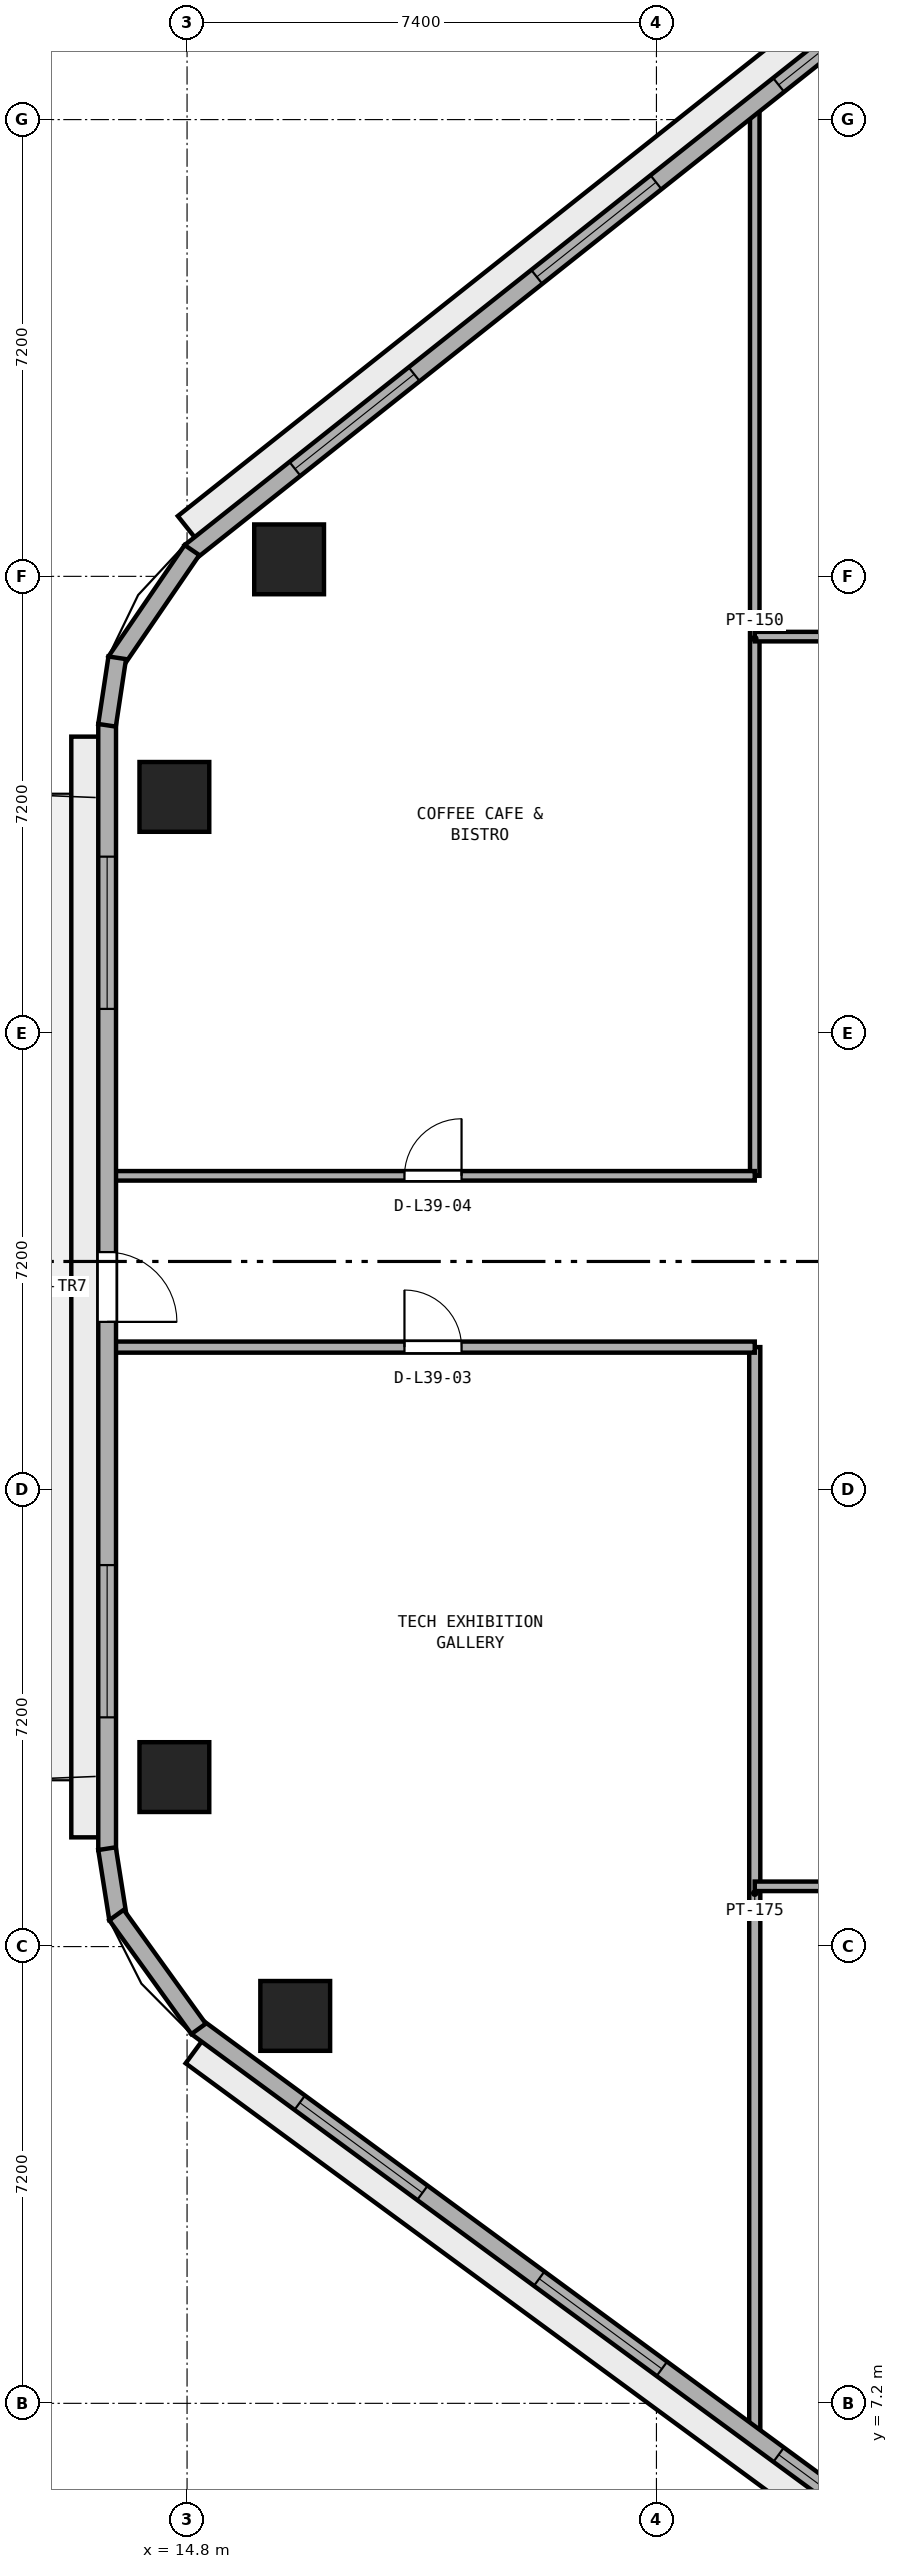
"""IFC4 building model, lengths in metres.
Left out: names, types, materials, properties, quantities, classifications, styles, units other than length and angle.
Written with IfcOpenShell. Run it as: python <this file> out.ifc"""

import sys

from ifc_helpers import new_model, si_unit, direction, frame, frame_2d, origin, origin_2d, place, context, subcontext, project, spatial, rectangle, extrude, element, fill, save


model = new_model("IFC4")
c1 = context("Model", 3, precision=1e-05, world=origin(), true_north=direction((0.0, 1.0)))
c2 = subcontext(c1, "Body", "Model", "MODEL_VIEW")
j1 = project(units=[si_unit("LENGTHUNIT", "METRE"), si_unit("PLANEANGLEUNIT", "RADIAN")], contexts=[c1])
p1 = place(None, origin())
s1 = spatial("IfcSite", under=j1, at=p1, CompositionType="ELEMENT")
p2 = place(p1, origin())
s2 = spatial("IfcBuilding", under=s1, at=p2, CompositionType="ELEMENT")
p3 = place(p2, frame((0.0, 0.0, 155.4)))
s3 = spatial("IfcBuildingStorey", under=s2, at=p3, CompositionType="ELEMENT", Elevation=155.4)
for number, where, z_axis, x_axis in (
    (1, (16.409, 36.268, 0.0), (0.0, 0.0, 1.0), (1.0, 0.0, 0.0)),
    (2, (14.6, 32.523, 0.0), (0.0, 0.0, 1.0), (1.0, 0.0, 0.0)),
    (3, (14.6, 17.072, 0.0), (0.0, 0.0, 1.0), (1.0, 0.0, 0.0)),
    (4, (16.505, 13.307, 0.0), (0.0, 0.0, 1.0), (1.0, 0.0, 0.0)),
):
    element("IfcColumn", number, at=place(p3, frame(where, z_axis=z_axis, x_axis=x_axis)), inside=s3, PredefinedType="COLUMN", context=c2, shape_type="SweptSolid", body=[
        extrude(rectangle(XDim=1.1, YDim=1.1, at=origin_2d()), origin(), (0.0, 0.0, 1.0), 3.8),
    ])
p4 = place(p3, frame((23.75, 6.634, 0.0), z_axis=(0.0, 0.0, 1.0), x_axis=(0.0, 1.0, 0.0)))
e5 = element("IfcWall", 5, at=p4, inside=s3, PredefinedType="PARTITIONING", context=c2, shape_type="SweptSolid", body=[
    extrude(rectangle(XDim=17.216, YDim=0.175, at=frame_2d((8.608, 0.0))), origin(), (0.0, 0.0, 1.0), 3.54),
])
p5 = place(p3, frame((23.75, 26.55, 0.0), z_axis=(0.0, 0.0, 1.0), x_axis=(0.0, 1.0, 0.0)))
e6 = element("IfcWall", 6, at=p5, inside=s3, PredefinedType="PARTITIONING", context=c2, shape_type="SweptSolid", body=[
    extrude(rectangle(XDim=16.937, YDim=0.15, at=frame_2d((8.468, 0.0))), origin(), (0.0, 0.0, 1.0), 3.54),
])
p6 = place(p3, frame((23.75, 15.35, 0.0), z_axis=(0.0, 0.0, 1.0), x_axis=(1.0, 0.0, 0.0)))
e7 = element("IfcWall", 7, at=p6, inside=s3, PredefinedType="PARTITIONING", context=c2, shape_type="SweptSolid", body=[
    extrude(rectangle(XDim=10.65, YDim=0.15, at=frame_2d((5.325, 0.0))), origin(), (0.0, 0.0, 1.0), 3.54),
])
p7 = place(p6, frame((4.875, 0.0, 0.0)))
e8 = element("IfcOpeningElement", 8, at=p7, cuts=e7, PredefinedType="OPENING", context=c2, shape_type="SweptSolid", body=[
    extrude(rectangle(XDim=0.9, YDim=2.1, at=frame_2d((0.45, 1.05))), frame((0.0, 0.085, 0.0), z_axis=(0.0, -1.0, 0.0), x_axis=(1.0, 0.0, 0.0)), (0.0, 0.0, 1.0), 0.17),
])
p8 = place(p3, frame((13.605, 23.85, 0.0), z_axis=(0.0, 0.0, 1.0), x_axis=(1.0, 0.0, 0.0)))
e9 = element("IfcWall", 9, at=p8, inside=s3, PredefinedType="PARTITIONING", context=c2, shape_type="SweptSolid", body=[
    extrude(rectangle(XDim=10.145, YDim=0.175, at=frame_2d((5.073, 0.0))), origin(), (0.0, 0.0, 1.0), 3.54),
])
p9 = place(p8, frame((4.623, 0.0, 0.0)))
e10 = element("IfcOpeningElement", 10, at=p9, cuts=e9, PredefinedType="OPENING", context=c2, shape_type="SweptSolid", body=[
    extrude(rectangle(XDim=0.9, YDim=2.1, at=frame_2d((0.45, 1.05))), frame((0.0, 0.097, 0.0), z_axis=(0.0, -1.0, 0.0), x_axis=(1.0, 0.0, 0.0)), (0.0, 0.0, 1.0), 0.195),
])
p10 = place(p3, frame((13.605, 26.55, 0.0), z_axis=(0.0, 0.0, 1.0), x_axis=(1.0, 0.0, 0.0)))
e11 = element("IfcWall", 11, at=p10, inside=s3, PredefinedType="PARTITIONING", context=c2, shape_type="SweptSolid", body=[
    extrude(rectangle(XDim=10.145, YDim=0.15, at=frame_2d((5.073, 0.0))), origin(), (0.0, 0.0, 1.0), 3.54),
])
p11 = place(p10, frame((4.623, 0.0, 0.0)))
e12 = element("IfcOpeningElement", 12, at=p11, cuts=e11, PredefinedType="OPENING", context=c2, shape_type="SweptSolid", body=[
    extrude(rectangle(XDim=0.9, YDim=2.1, at=frame_2d((0.45, 1.05))), frame((0.0, 0.085, 0.0), z_axis=(0.0, -1.0, 0.0), x_axis=(1.0, 0.0, 0.0)), (0.0, 0.0, 1.0), 0.17),
])
p12 = place(p3, frame((23.75, 35.05, 0.0), z_axis=(0.0, 0.0, 1.0), x_axis=(1.0, 0.0, 0.0)))
e13 = element("IfcWall", 13, at=p12, inside=s3, PredefinedType="PARTITIONING", context=c2, shape_type="SweptSolid", body=[
    extrude(rectangle(XDim=26.5, YDim=0.15, at=frame_2d((13.25, 0.0))), origin(), (0.0, 0.0, 1.0), 3.54),
])
p13 = place(p12, frame((12.75, 0.0, 0.0)))
e14 = element("IfcOpeningElement", 14, at=p13, cuts=e13, PredefinedType="OPENING", context=c2, shape_type="SweptSolid", body=[
    extrude(rectangle(XDim=1.0, YDim=2.12, at=frame_2d((0.5, 1.06))), frame((0.0, 0.085, 0.0), z_axis=(0.0, -1.0, 0.0), x_axis=(1.0, 0.0, 0.0)), (0.0, 0.0, 1.0), 0.17),
])
p14 = place(p3, frame((27.658, 46.55, 0.0), z_axis=(0.0, 0.0, 1.0), x_axis=(-0.783266285861, -0.621686356158, 0.0)))
e15 = element("IfcWall", 15, at=p14, inside=s3, PredefinedType="STANDARD", context=c2, shape_type="SweptSolid", body=[
    extrude(rectangle(XDim=16.353, YDim=0.28, at=frame_2d((8.177, 0.0))), origin(), (0.0, 0.0, 1.0), 3.54),
])
p15 = place(p14, frame((2.109, 0.0, 0.9)))
e16 = element("IfcOpeningElement", 16, at=p15, cuts=e15, PredefinedType="OPENING", context=c2, shape_type="SweptSolid", body=[
    extrude(rectangle(XDim=2.4, YDim=1.75, at=frame_2d((1.2, 0.875))), frame((0.0, 0.15, 0.0), z_axis=(0.0, -1.0, 0.0), x_axis=(1.0, 0.0, 0.0)), (0.0, 0.0, 1.0), 0.3),
])
p16 = place(p14, frame((6.977, 0.0, 0.9)))
e17 = element("IfcOpeningElement", 17, at=p16, cuts=e15, PredefinedType="OPENING", context=c2, shape_type="SweptSolid", body=[
    extrude(rectangle(XDim=2.4, YDim=1.75, at=frame_2d((1.2, 0.875))), frame((0.0, 0.15, 0.0), z_axis=(0.0, -1.0, 0.0), x_axis=(1.0, 0.0, 0.0)), (0.0, 0.0, 1.0), 0.3),
])
p17 = place(p14, frame((11.844, 0.0, 0.9)))
e18 = element("IfcOpeningElement", 18, at=p17, cuts=e15, PredefinedType="OPENING", context=c2, shape_type="SweptSolid", body=[
    extrude(rectangle(XDim=2.4, YDim=1.75, at=frame_2d((1.2, 0.875))), frame((0.0, 0.15, 0.0), z_axis=(0.0, -1.0, 0.0), x_axis=(1.0, 0.0, 0.0)), (0.0, 0.0, 1.0), 0.3),
])
p18 = place(p3, frame((13.54, 33.673, 0.0), z_axis=(0.0, 0.0, 1.0), x_axis=(0.0, -1.0, 0.0)))
e19 = element("IfcWall", 19, at=p18, inside=s3, PredefinedType="STANDARD", context=c2, shape_type="SweptSolid", body=[
    extrude(rectangle(XDim=17.751, YDim=0.28, at=frame_2d((8.875, 0.0))), origin(), (0.0, 0.0, 1.0), 3.54),
])
p19 = place(p18, frame((8.326, 0.0, 0.0)))
e20 = element("IfcOpeningElement", 20, at=p19, cuts=e19, PredefinedType="OPENING", context=c2, shape_type="SweptSolid", body=[
    extrude(rectangle(XDim=1.1, YDim=2.2, at=frame_2d((0.55, 1.1))), frame((0.0, 0.15, 0.0), z_axis=(0.0, -1.0, 0.0), x_axis=(1.0, 0.0, 0.0)), (0.0, 0.0, 1.0), 0.3),
])
p20 = place(p18, frame((2.092, 0.0, 0.9)))
e21 = element("IfcOpeningElement", 21, at=p20, cuts=e19, PredefinedType="OPENING", context=c2, shape_type="SweptSolid", body=[
    extrude(rectangle(XDim=2.4, YDim=1.75, at=frame_2d((1.2, 0.875))), frame((0.0, 0.15, 0.0), z_axis=(0.0, -1.0, 0.0), x_axis=(1.0, 0.0, 0.0)), (0.0, 0.0, 1.0), 0.3),
])
p21 = place(p18, frame((13.26, 0.0, 0.9)))
e22 = element("IfcOpeningElement", 22, at=p21, cuts=e19, PredefinedType="OPENING", context=c2, shape_type="SweptSolid", body=[
    extrude(rectangle(XDim=2.4, YDim=1.75, at=frame_2d((1.2, 0.875))), frame((0.0, 0.15, 0.0), z_axis=(0.0, -1.0, 0.0), x_axis=(1.0, 0.0, 0.0)), (0.0, 0.0, 1.0), 0.3),
])
p22 = place(p3, frame((14.951, 13.134, 0.0), z_axis=(0.0, 0.0, 1.0), x_axis=(0.805804940328, -0.592181051827, 0.0)))
e23 = element("IfcWall", 23, at=p22, inside=s3, PredefinedType="STANDARD", context=c2, shape_type="SweptSolid", body=[
    extrude(rectangle(XDim=15.804, YDim=0.28, at=frame_2d((7.902, 0.0))), origin(), (0.0, 0.0, 1.0), 3.54),
])
p23 = place(p22, frame((2.017, 0.0, 0.9)))
e24 = element("IfcOpeningElement", 24, at=p23, cuts=e23, PredefinedType="OPENING", context=c2, shape_type="SweptSolid", body=[
    extrude(rectangle(XDim=2.4, YDim=1.75, at=frame_2d((1.2, 0.875))), frame((0.0, 0.15, 0.0), z_axis=(0.0, -1.0, 0.0), x_axis=(1.0, 0.0, 0.0)), (0.0, 0.0, 1.0), 0.3),
])
p24 = place(p22, frame((6.702, 0.0, 0.9)))
e25 = element("IfcOpeningElement", 25, at=p24, cuts=e23, PredefinedType="OPENING", context=c2, shape_type="SweptSolid", body=[
    extrude(rectangle(XDim=2.4, YDim=1.75, at=frame_2d((1.2, 0.875))), frame((0.0, 0.15, 0.0), z_axis=(0.0, -1.0, 0.0), x_axis=(1.0, 0.0, 0.0)), (0.0, 0.0, 1.0), 0.3),
])
p25 = place(p22, frame((11.387, 0.0, 0.9)))
e26 = element("IfcOpeningElement", 26, at=p25, cuts=e23, PredefinedType="OPENING", context=c2, shape_type="SweptSolid", body=[
    extrude(rectangle(XDim=2.4, YDim=1.75, at=frame_2d((1.2, 0.875))), frame((0.0, 0.15, 0.0), z_axis=(0.0, -1.0, 0.0), x_axis=(1.0, 0.0, 0.0)), (0.0, 0.0, 1.0), 0.3),
])
p26 = place(p3, frame((14.878, 36.414, 0.0), z_axis=(0.0, 0.0, 1.0), x_axis=(-0.564564614133, -0.825388875906, 0.0)))
e27 = element("IfcWall", 27, at=p26, inside=s3, PredefinedType="STANDARD", context=c2, shape_type="SweptSolid", body=[
    extrude(rectangle(XDim=2.128, YDim=0.28, at=frame_2d((1.064, 0.0))), origin(), (0.0, 0.0, 1.0), 3.54),
])
p27 = place(p3, frame((13.699, 34.716, 0.0), z_axis=(0.0, 0.0, 1.0), x_axis=(-0.149549920187, -0.988754176412, 0.0)))
e28 = element("IfcWall", 28, at=p27, inside=s3, PredefinedType="STANDARD", context=c2, shape_type="SweptSolid", body=[
    extrude(rectangle(XDim=1.076, YDim=0.28, at=frame_2d((0.538, 0.0))), origin(), (0.0, 0.0, 1.0), 3.54),
])
p28 = place(p3, frame((13.538, 15.944, 0.0), z_axis=(0.0, 0.0, 1.0), x_axis=(0.155447556013, -0.987844146275, 0.0)))
e29 = element("IfcWall", 29, at=p28, inside=s3, PredefinedType="STANDARD", context=c2, shape_type="SweptSolid", body=[
    extrude(rectangle(XDim=1.12, YDim=0.28, at=frame_2d((0.56, 0.0))), origin(), (0.0, 0.0, 1.0), 3.54),
])
p29 = place(p3, frame((13.688, 14.898, 0.0), z_axis=(0.0, 0.0, 1.0), x_axis=(0.584833657716, -0.811153248655, 0.0)))
e30 = element("IfcWall", 30, at=p29, inside=s3, PredefinedType="STANDARD", context=c2, shape_type="SweptSolid", body=[
    extrude(rectangle(XDim=2.212, YDim=0.28, at=frame_2d((1.106, 0.0))), origin(), (0.0, 0.0, 1.0), 3.54),
])
p30 = place(p9, origin())
e31 = element("IfcDoor", 31, at=p30, inside=s3, OperationType="SINGLE_SWING_LEFT", PredefinedType="DOOR", context=c2, shape_type="SweptSolid", body=[
    extrude(rectangle(XDim=0.9, YDim=2.1, at=frame_2d((0.45, 1.05))), frame((0.0, 0.025, 0.0), z_axis=(0.0, -1.0, 0.0), x_axis=(1.0, 0.0, 0.0)), (0.0, 0.0, 1.0), 0.05),
])
fill(e10, e31)
p31 = place(p11, origin())
e32 = element("IfcDoor", 32, at=p31, inside=s3, OperationType="SINGLE_SWING_RIGHT", PredefinedType="DOOR", context=c2, shape_type="SweptSolid", body=[
    extrude(rectangle(XDim=0.9, YDim=2.1, at=frame_2d((0.45, 1.05))), frame((0.0, 0.025, 0.0), z_axis=(0.0, -1.0, 0.0), x_axis=(1.0, 0.0, 0.0)), (0.0, 0.0, 1.0), 0.05),
])
fill(e12, e32)
p32 = place(p15, origin())
e33 = element("IfcWindow", 33, at=p32, inside=s3, PartitioningType="SINGLE_PANEL", PredefinedType="WINDOW", context=c2, shape_type="SweptSolid", body=[
    extrude(rectangle(XDim=2.4, YDim=1.75, at=frame_2d((1.2, 0.875))), frame((0.0, 0.03, 0.0), z_axis=(0.0, -1.0, 0.0), x_axis=(1.0, 0.0, 0.0)), (0.0, 0.0, 1.0), 0.06),
])
fill(e16, e33)
p33 = place(p16, origin())
e34 = element("IfcWindow", 34, at=p33, inside=s3, PartitioningType="SINGLE_PANEL", PredefinedType="WINDOW", context=c2, shape_type="SweptSolid", body=[
    extrude(rectangle(XDim=2.4, YDim=1.75, at=frame_2d((1.2, 0.875))), frame((0.0, 0.03, 0.0), z_axis=(0.0, -1.0, 0.0), x_axis=(1.0, 0.0, 0.0)), (0.0, 0.0, 1.0), 0.06),
])
fill(e17, e34)
p34 = place(p17, origin())
e35 = element("IfcWindow", 35, at=p34, inside=s3, PartitioningType="SINGLE_PANEL", PredefinedType="WINDOW", context=c2, shape_type="SweptSolid", body=[
    extrude(rectangle(XDim=2.4, YDim=1.75, at=frame_2d((1.2, 0.875))), frame((0.0, 0.03, 0.0), z_axis=(0.0, -1.0, 0.0), x_axis=(1.0, 0.0, 0.0)), (0.0, 0.0, 1.0), 0.06),
])
fill(e18, e35)
p35 = place(p19, origin())
e36 = element("IfcDoor", 36, at=p35, inside=s3, OperationType="SINGLE_SWING_RIGHT", PredefinedType="DOOR", context=c2, shape_type="SweptSolid", body=[
    extrude(rectangle(XDim=1.1, YDim=2.2, at=frame_2d((0.55, 1.1))), frame((0.0, 0.025, 0.0), z_axis=(0.0, -1.0, 0.0), x_axis=(1.0, 0.0, 0.0)), (0.0, 0.0, 1.0), 0.05),
])
fill(e20, e36)
p36 = place(p20, origin())
e37 = element("IfcWindow", 37, at=p36, inside=s3, PartitioningType="SINGLE_PANEL", PredefinedType="WINDOW", context=c2, shape_type="SweptSolid", body=[
    extrude(rectangle(XDim=2.4, YDim=1.75, at=frame_2d((1.2, 0.875))), frame((0.0, 0.03, 0.0), z_axis=(0.0, -1.0, 0.0), x_axis=(1.0, 0.0, 0.0)), (0.0, 0.0, 1.0), 0.06),
])
fill(e21, e37)
p37 = place(p21, origin())
e38 = element("IfcWindow", 38, at=p37, inside=s3, PartitioningType="SINGLE_PANEL", PredefinedType="WINDOW", context=c2, shape_type="SweptSolid", body=[
    extrude(rectangle(XDim=2.4, YDim=1.75, at=frame_2d((1.2, 0.875))), frame((0.0, 0.03, 0.0), z_axis=(0.0, -1.0, 0.0), x_axis=(1.0, 0.0, 0.0)), (0.0, 0.0, 1.0), 0.06),
])
fill(e22, e38)
p38 = place(p23, origin())
e39 = element("IfcWindow", 39, at=p38, inside=s3, PartitioningType="SINGLE_PANEL", PredefinedType="WINDOW", context=c2, shape_type="SweptSolid", body=[
    extrude(rectangle(XDim=2.4, YDim=1.75, at=frame_2d((1.2, 0.875))), frame((0.0, 0.03, 0.0), z_axis=(0.0, -1.0, 0.0), x_axis=(1.0, 0.0, 0.0)), (0.0, 0.0, 1.0), 0.06),
])
fill(e24, e39)
p39 = place(p24, origin())
e40 = element("IfcWindow", 40, at=p39, inside=s3, PartitioningType="SINGLE_PANEL", PredefinedType="WINDOW", context=c2, shape_type="SweptSolid", body=[
    extrude(rectangle(XDim=2.4, YDim=1.75, at=frame_2d((1.2, 0.875))), frame((0.0, 0.03, 0.0), z_axis=(0.0, -1.0, 0.0), x_axis=(1.0, 0.0, 0.0)), (0.0, 0.0, 1.0), 0.06),
])
fill(e25, e40)
p40 = place(p25, origin())
e41 = element("IfcWindow", 41, at=p40, inside=s3, PartitioningType="SINGLE_PANEL", PredefinedType="WINDOW", context=c2, shape_type="SweptSolid", body=[
    extrude(rectangle(XDim=2.4, YDim=1.75, at=frame_2d((1.2, 0.875))), frame((0.0, 0.03, 0.0), z_axis=(0.0, -1.0, 0.0), x_axis=(1.0, 0.0, 0.0)), (0.0, 0.0, 1.0), 0.06),
])
fill(e26, e41)
save(model, sys.argv[1])
